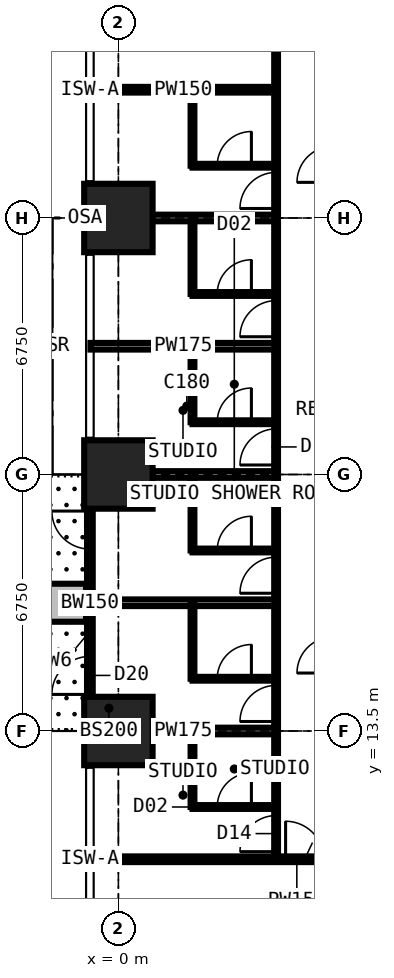
"""IFC4 building model, lengths in metres.
Left out: names, types, materials, properties, quantities, classifications, styles, units other than length and angle.
Written with IfcOpenShell. Run it as: python <this file> out.ifc"""

import sys

from ifc_helpers import new_model, si_unit, direction, frame, frame_2d, origin, origin_2d, place, context, subcontext, project, spatial, rectangle, extrude, element, fill, save


model = new_model("IFC4")
c1 = context("Model", 3, precision=1e-05, world=origin(), true_north=direction((0.0, 1.0)))
c2 = subcontext(c1, "Body", "Model", "MODEL_VIEW")
j1 = project(units=[si_unit("LENGTHUNIT", "METRE"), si_unit("PLANEANGLEUNIT", "RADIAN")], contexts=[c1])
p1 = place(None, origin())
s1 = spatial("IfcSite", under=j1, at=p1, CompositionType="ELEMENT")
p2 = place(p1, origin())
s2 = spatial("IfcBuilding", under=s1, at=p2, CompositionType="ELEMENT")
p3 = place(p2, frame((0.0, 0.0, 61.2)))
s3 = spatial("IfcBuildingStorey", under=s2, at=p3, CompositionType="ELEMENT", Elevation=61.2)
for number, where, z_axis, x_axis in (
    (1, (0.0, 13.5, 0.0), (0.0, 0.0, 1.0), (1.0, 0.0, 0.0)),
    (2, (0.0, 20.25, 0.0), (0.0, 0.0, 1.0), (1.0, 0.0, 0.0)),
    (3, (0.0, 27.0, 0.0), (0.0, 0.0, 1.0), (1.0, 0.0, 0.0)),
):
    element("IfcColumn", number, at=place(p3, frame(where, z_axis=z_axis, x_axis=x_axis)), inside=s3, PredefinedType="COLUMN", context=c2, shape_type="SweptSolid", body=[
        extrude(rectangle(XDim=1.8, YDim=1.8, at=origin_2d()), origin(), (0.0, 0.0, 1.0), 3.6),
    ])
p4 = place(p3, frame((-0.75, 13.5, 0.0), z_axis=(0.0, 0.0, 1.0), x_axis=(0.0, 1.0, 0.0)))
e4 = element("IfcWall", 4, at=p4, inside=s3, PredefinedType="SOLIDWALL", context=c2, shape_type="SweptSolid", body=[
    extrude(rectangle(XDim=6.75, YDim=0.15, at=frame_2d((3.375, 0.0))), origin(), (0.0, 0.0, 1.0), 3.375),
])
p5 = place(p4, frame((0.962, 0.0, 0.0)))
e5 = element("IfcOpeningElement", 5, at=p5, cuts=e4, PredefinedType="OPENING", context=c2, shape_type="SweptSolid", body=[
    extrude(rectangle(XDim=1.0, YDim=2.2, at=frame_2d((0.5, 1.1))), frame((0.0, 0.085, 0.0), z_axis=(0.0, -1.0, 0.0), x_axis=(1.0, 0.0, 0.0)), (0.0, 0.0, 1.0), 0.17),
])
p6 = place(p4, frame((2.025, 0.0, 0.9)))
e6 = element("IfcOpeningElement", 6, at=p6, cuts=e4, PredefinedType="OPENING", context=c2, shape_type="SweptSolid", body=[
    extrude(rectangle(XDim=1.2, YDim=1.8, at=frame_2d((0.6, 0.9))), frame((0.0, 0.085, 0.0), z_axis=(0.0, -1.0, 0.0), x_axis=(1.0, 0.0, 0.0)), (0.0, 0.0, 1.0), 0.17),
])
p7 = place(p4, frame((4.788, 0.0, 0.0)))
e7 = element("IfcOpeningElement", 7, at=p7, cuts=e4, PredefinedType="OPENING", context=c2, shape_type="SweptSolid", body=[
    extrude(rectangle(XDim=1.0, YDim=2.2, at=frame_2d((0.5, 1.1))), frame((0.0, 0.085, 0.0), z_axis=(0.0, -1.0, 0.0), x_axis=(1.0, 0.0, 0.0)), (0.0, 0.0, 1.0), 0.17),
])
p8 = place(p4, frame((3.525, 0.0, 0.9)))
e8 = element("IfcOpeningElement", 8, at=p8, cuts=e4, PredefinedType="OPENING", context=c2, shape_type="SweptSolid", body=[
    extrude(rectangle(XDim=1.2, YDim=1.8, at=frame_2d((0.6, 0.9))), frame((0.0, 0.085, 0.0), z_axis=(0.0, -1.0, 0.0), x_axis=(1.0, 0.0, 0.0)), (0.0, 0.0, 1.0), 0.17),
])
p9 = place(p3, frame((-0.85, 16.875, 0.0), z_axis=(0.0, 0.0, 1.0), x_axis=(-1.0, 0.0, 0.0)))
e9 = element("IfcWall", 9, at=p9, inside=s3, PredefinedType="USERDEFINED", context=c2, shape_type="SweptSolid", body=[
    extrude(rectangle(XDim=2.2, YDim=1.0, at=frame_2d((1.1, 0.0))), origin(), (0.0, 0.0, 1.0), 0.9),
])
p10 = place(p3, frame((-0.734, 10.125, 0.0), z_axis=(0.0, 0.0, 1.0), x_axis=(1.0, 0.0, 0.0)))
e10 = element("IfcWall", 10, at=p10, inside=s3, PredefinedType="PARTITIONING", context=c2, shape_type="SweptSolid", body=[
    extrude(rectangle(XDim=10.859, YDim=0.15, at=frame_2d((5.429, 0.0))), origin(), (0.0, 0.0, 1.0), 3.375),
])
p11 = place(p10, frame((5.134, 0.0, 0.0)))
e11 = element("IfcOpeningElement", 11, at=p11, cuts=e10, PredefinedType="OPENING", context=c2, shape_type="SweptSolid", body=[
    extrude(rectangle(XDim=1.0, YDim=2.2, at=frame_2d((0.5, 1.1))), frame((0.0, 0.085, 0.0), z_axis=(0.0, -1.0, 0.0), x_axis=(1.0, 0.0, 0.0)), (0.0, 0.0, 1.0), 0.17),
])
p12 = place(p3, frame((-0.734, 13.5, 0.0), z_axis=(0.0, 0.0, 1.0), x_axis=(1.0, 0.0, 0.0)))
e12 = element("IfcWall", 12, at=p12, inside=s3, PredefinedType="PARTITIONING", context=c2, shape_type="SweptSolid", body=[
    extrude(rectangle(XDim=4.884, YDim=0.175, at=frame_2d((2.442, 0.0))), origin(), (0.0, 0.0, 1.0), 2.877),
])
p13 = place(p3, frame((-0.734, 16.875, 0.0), z_axis=(0.0, 0.0, 1.0), x_axis=(1.0, 0.0, 0.0)))
e13 = element("IfcWall", 13, at=p13, inside=s3, PredefinedType="PARTITIONING", context=c2, shape_type="SweptSolid", body=[
    extrude(rectangle(XDim=4.884, YDim=0.175, at=frame_2d((2.442, 0.0))), origin(), (0.0, 0.0, 1.0), 3.375),
])
p14 = place(p3, frame((-0.734, 20.25, 0.0), z_axis=(0.0, 0.0, 1.0), x_axis=(1.0, 0.0, 0.0)))
e14 = element("IfcWall", 14, at=p14, inside=s3, PredefinedType="PARTITIONING", context=c2, shape_type="SweptSolid", body=[
    extrude(rectangle(XDim=4.884, YDim=0.175, at=frame_2d((2.442, 0.0))), origin(), (0.0, 0.0, 1.0), 2.61),
])
p15 = place(p3, frame((-0.734, 23.625, 0.0), z_axis=(0.0, 0.0, 1.0), x_axis=(1.0, 0.0, 0.0)))
e15 = element("IfcWall", 15, at=p15, inside=s3, PredefinedType="PARTITIONING", context=c2, shape_type="SweptSolid", body=[
    extrude(rectangle(XDim=4.884, YDim=0.175, at=frame_2d((2.442, 0.0))), origin(), (0.0, 0.0, 1.0), 3.375),
])
p16 = place(p3, frame((-0.734, 27.0, 0.0), z_axis=(0.0, 0.0, 1.0), x_axis=(1.0, 0.0, 0.0)))
e16 = element("IfcWall", 16, at=p16, inside=s3, PredefinedType="PARTITIONING", context=c2, shape_type="SweptSolid", body=[
    extrude(rectangle(XDim=4.884, YDim=0.175, at=frame_2d((2.442, 0.0))), origin(), (0.0, 0.0, 1.0), 2.61),
])
p17 = place(p3, frame((-0.734, 30.375, 0.0), z_axis=(0.0, 0.0, 1.0), x_axis=(1.0, 0.0, 0.0)))
e17 = element("IfcWall", 17, at=p17, inside=s3, PredefinedType="PARTITIONING", context=c2, shape_type="SweptSolid", body=[
    extrude(rectangle(XDim=4.884, YDim=0.15, at=frame_2d((2.442, 0.0))), origin(), (0.0, 0.0, 1.0), 3.375),
])
p18 = place(p3, frame((1.95, 11.5, 0.0), z_axis=(0.0, 0.0, 1.0), x_axis=(0.0, 1.0, 0.0)))
e18 = element("IfcWall", 18, at=p18, inside=s3, PredefinedType="PARTITIONING", context=c2, shape_type="SweptSolid", body=[
    extrude(rectangle(XDim=2.0, YDim=0.1, at=frame_2d((1.0, 0.0))), origin(), (0.0, 0.0, 1.0), 3.375),
])
p19 = place(p3, frame((1.95, 11.5, 0.0), z_axis=(0.0, 0.0, 1.0), x_axis=(1.0, 0.0, 0.0)))
e19 = element("IfcWall", 19, at=p19, inside=s3, PredefinedType="PARTITIONING", context=c2, shape_type="SweptSolid", body=[
    extrude(rectangle(XDim=2.2, YDim=0.1, at=frame_2d((1.1, 0.0))), origin(), (0.0, 0.0, 1.0), 3.375),
])
p20 = place(p19, frame((0.65, 0.0, 0.0)))
e20 = element("IfcOpeningElement", 20, at=p20, cuts=e19, PredefinedType="OPENING", context=c2, shape_type="SweptSolid", body=[
    extrude(rectangle(XDim=0.9, YDim=2.2, at=frame_2d((0.45, 1.1))), frame((0.0, 0.06, 0.0), z_axis=(0.0, -1.0, 0.0), x_axis=(1.0, 0.0, 0.0)), (0.0, 0.0, 1.0), 0.12),
])
p21 = place(p3, frame((1.95, 14.875, 0.0), z_axis=(0.0, 0.0, 1.0), x_axis=(0.0, 1.0, 0.0)))
e21 = element("IfcWall", 21, at=p21, inside=s3, PredefinedType="PARTITIONING", context=c2, shape_type="SweptSolid", body=[
    extrude(rectangle(XDim=2.0, YDim=0.1, at=frame_2d((1.0, 0.0))), origin(), (0.0, 0.0, 1.0), 3.375),
])
p22 = place(p3, frame((1.95, 14.875, 0.0), z_axis=(0.0, 0.0, 1.0), x_axis=(1.0, 0.0, 0.0)))
e22 = element("IfcWall", 22, at=p22, inside=s3, PredefinedType="PARTITIONING", context=c2, shape_type="SweptSolid", body=[
    extrude(rectangle(XDim=2.2, YDim=0.1, at=frame_2d((1.1, 0.0))), origin(), (0.0, 0.0, 1.0), 3.375),
])
p23 = place(p22, frame((0.65, 0.0, 0.0)))
e23 = element("IfcOpeningElement", 23, at=p23, cuts=e22, PredefinedType="OPENING", context=c2, shape_type="SweptSolid", body=[
    extrude(rectangle(XDim=0.9, YDim=2.2, at=frame_2d((0.45, 1.1))), frame((0.0, 0.06, 0.0), z_axis=(0.0, -1.0, 0.0), x_axis=(1.0, 0.0, 0.0)), (0.0, 0.0, 1.0), 0.12),
])
p24 = place(p3, frame((1.95, 18.25, 0.0), z_axis=(0.0, 0.0, 1.0), x_axis=(0.0, 1.0, 0.0)))
e24 = element("IfcWall", 24, at=p24, inside=s3, PredefinedType="PARTITIONING", context=c2, shape_type="SweptSolid", body=[
    extrude(rectangle(XDim=2.0, YDim=0.1, at=frame_2d((1.0, 0.0))), origin(), (0.0, 0.0, 1.0), 3.375),
])
p25 = place(p3, frame((1.95, 18.25, 0.0), z_axis=(0.0, 0.0, 1.0), x_axis=(1.0, 0.0, 0.0)))
e25 = element("IfcWall", 25, at=p25, inside=s3, PredefinedType="PARTITIONING", context=c2, shape_type="SweptSolid", body=[
    extrude(rectangle(XDim=2.2, YDim=0.1, at=frame_2d((1.1, 0.0))), origin(), (0.0, 0.0, 1.0), 3.375),
])
p26 = place(p25, frame((0.65, 0.0, 0.0)))
e26 = element("IfcOpeningElement", 26, at=p26, cuts=e25, PredefinedType="OPENING", context=c2, shape_type="SweptSolid", body=[
    extrude(rectangle(XDim=0.9, YDim=2.2, at=frame_2d((0.45, 1.1))), frame((0.0, 0.06, 0.0), z_axis=(0.0, -1.0, 0.0), x_axis=(1.0, 0.0, 0.0)), (0.0, 0.0, 1.0), 0.12),
])
p27 = place(p3, frame((1.95, 21.625, 0.0), z_axis=(0.0, 0.0, 1.0), x_axis=(0.0, 1.0, 0.0)))
e27 = element("IfcWall", 27, at=p27, inside=s3, PredefinedType="PARTITIONING", context=c2, shape_type="SweptSolid", body=[
    extrude(rectangle(XDim=2.0, YDim=0.1, at=frame_2d((1.0, 0.0))), origin(), (0.0, 0.0, 1.0), 3.375),
])
p28 = place(p3, frame((1.95, 21.625, 0.0), z_axis=(0.0, 0.0, 1.0), x_axis=(1.0, 0.0, 0.0)))
e28 = element("IfcWall", 28, at=p28, inside=s3, PredefinedType="PARTITIONING", context=c2, shape_type="SweptSolid", body=[
    extrude(rectangle(XDim=2.2, YDim=0.1, at=frame_2d((1.1, 0.0))), origin(), (0.0, 0.0, 1.0), 3.375),
])
p29 = place(p28, frame((0.65, 0.0, 0.0)))
e29 = element("IfcOpeningElement", 29, at=p29, cuts=e28, PredefinedType="OPENING", context=c2, shape_type="SweptSolid", body=[
    extrude(rectangle(XDim=0.9, YDim=2.2, at=frame_2d((0.45, 1.1))), frame((0.0, 0.06, 0.0), z_axis=(0.0, -1.0, 0.0), x_axis=(1.0, 0.0, 0.0)), (0.0, 0.0, 1.0), 0.12),
])
p30 = place(p3, frame((1.95, 25.0, 0.0), z_axis=(0.0, 0.0, 1.0), x_axis=(0.0, 1.0, 0.0)))
e30 = element("IfcWall", 30, at=p30, inside=s3, PredefinedType="PARTITIONING", context=c2, shape_type="SweptSolid", body=[
    extrude(rectangle(XDim=2.0, YDim=0.1, at=frame_2d((1.0, 0.0))), origin(), (0.0, 0.0, 1.0), 3.375),
])
p31 = place(p3, frame((1.95, 25.0, 0.0), z_axis=(0.0, 0.0, 1.0), x_axis=(1.0, 0.0, 0.0)))
e31 = element("IfcWall", 31, at=p31, inside=s3, PredefinedType="PARTITIONING", context=c2, shape_type="SweptSolid", body=[
    extrude(rectangle(XDim=2.2, YDim=0.1, at=frame_2d((1.1, 0.0))), origin(), (0.0, 0.0, 1.0), 3.375),
])
p32 = place(p31, frame((0.65, 0.0, 0.0)))
e32 = element("IfcOpeningElement", 32, at=p32, cuts=e31, PredefinedType="OPENING", context=c2, shape_type="SweptSolid", body=[
    extrude(rectangle(XDim=0.9, YDim=2.2, at=frame_2d((0.45, 1.1))), frame((0.0, 0.06, 0.0), z_axis=(0.0, -1.0, 0.0), x_axis=(1.0, 0.0, 0.0)), (0.0, 0.0, 1.0), 0.12),
])
p33 = place(p3, frame((1.95, 28.375, 0.0), z_axis=(0.0, 0.0, 1.0), x_axis=(0.0, 1.0, 0.0)))
e33 = element("IfcWall", 33, at=p33, inside=s3, PredefinedType="PARTITIONING", context=c2, shape_type="SweptSolid", body=[
    extrude(rectangle(XDim=2.0, YDim=0.1, at=frame_2d((1.0, 0.0))), origin(), (0.0, 0.0, 1.0), 3.375),
])
p34 = place(p3, frame((1.95, 28.375, 0.0), z_axis=(0.0, 0.0, 1.0), x_axis=(1.0, 0.0, 0.0)))
e34 = element("IfcWall", 34, at=p34, inside=s3, PredefinedType="PARTITIONING", context=c2, shape_type="SweptSolid", body=[
    extrude(rectangle(XDim=2.2, YDim=0.1, at=frame_2d((1.1, 0.0))), origin(), (0.0, 0.0, 1.0), 3.375),
])
p35 = place(p34, frame((0.65, 0.0, 0.0)))
e35 = element("IfcOpeningElement", 35, at=p35, cuts=e34, PredefinedType="OPENING", context=c2, shape_type="SweptSolid", body=[
    extrude(rectangle(XDim=0.9, YDim=2.2, at=frame_2d((0.45, 1.1))), frame((0.0, 0.06, 0.0), z_axis=(0.0, -1.0, 0.0), x_axis=(1.0, 0.0, 0.0)), (0.0, 0.0, 1.0), 0.12),
])
p36 = place(p3, frame((4.15, 10.125, 0.0), z_axis=(0.0, 0.0, 1.0), x_axis=(0.0, 1.0, 0.0)))
e36 = element("IfcWall", 36, at=p36, inside=s3, PredefinedType="PARTITIONING", context=c2, shape_type="SweptSolid", body=[
    extrude(rectangle(XDim=23.625, YDim=0.1, at=frame_2d((11.812, 0.0))), origin(), (0.0, 0.0, 1.0), 3.375),
])
p37 = place(p36, frame((0.2, 0.0, 0.0)))
e37 = element("IfcOpeningElement", 37, at=p37, cuts=e36, PredefinedType="OPENING", context=c2, shape_type="SweptSolid", body=[
    extrude(rectangle(XDim=0.95, YDim=2.2, at=frame_2d((0.475, 1.1))), frame((0.0, 0.06, 0.0), z_axis=(0.0, -1.0, 0.0), x_axis=(1.0, 0.0, 0.0)), (0.0, 0.0, 1.0), 0.12),
])
p38 = place(p36, frame((3.625, 0.0, 0.0)))
e38 = element("IfcOpeningElement", 38, at=p38, cuts=e36, PredefinedType="OPENING", context=c2, shape_type="SweptSolid", body=[
    extrude(rectangle(XDim=0.95, YDim=2.2, at=frame_2d((0.475, 1.1))), frame((0.0, 0.06, 0.0), z_axis=(0.0, -1.0, 0.0), x_axis=(1.0, 0.0, 0.0)), (0.0, 0.0, 1.0), 0.12),
])
p39 = place(p36, frame((7.0, 0.0, 0.0)))
e39 = element("IfcOpeningElement", 39, at=p39, cuts=e36, PredefinedType="OPENING", context=c2, shape_type="SweptSolid", body=[
    extrude(rectangle(XDim=0.95, YDim=2.2, at=frame_2d((0.475, 1.1))), frame((0.0, 0.06, 0.0), z_axis=(0.0, -1.0, 0.0), x_axis=(1.0, 0.0, 0.0)), (0.0, 0.0, 1.0), 0.12),
])
p40 = place(p36, frame((10.375, 0.0, 0.0)))
e40 = element("IfcOpeningElement", 40, at=p40, cuts=e36, PredefinedType="OPENING", context=c2, shape_type="SweptSolid", body=[
    extrude(rectangle(XDim=0.95, YDim=2.2, at=frame_2d((0.475, 1.1))), frame((0.0, 0.06, 0.0), z_axis=(0.0, -1.0, 0.0), x_axis=(1.0, 0.0, 0.0)), (0.0, 0.0, 1.0), 0.12),
])
p41 = place(p36, frame((13.75, 0.0, 0.0)))
e41 = element("IfcOpeningElement", 41, at=p41, cuts=e36, PredefinedType="OPENING", context=c2, shape_type="SweptSolid", body=[
    extrude(rectangle(XDim=0.95, YDim=2.2, at=frame_2d((0.475, 1.1))), frame((0.0, 0.06, 0.0), z_axis=(0.0, -1.0, 0.0), x_axis=(1.0, 0.0, 0.0)), (0.0, 0.0, 1.0), 0.12),
])
p42 = place(p36, frame((17.125, 0.0, 0.0)))
e42 = element("IfcOpeningElement", 42, at=p42, cuts=e36, PredefinedType="OPENING", context=c2, shape_type="SweptSolid", body=[
    extrude(rectangle(XDim=0.95, YDim=2.2, at=frame_2d((0.475, 1.1))), frame((0.0, 0.06, 0.0), z_axis=(0.0, -1.0, 0.0), x_axis=(1.0, 0.0, 0.0)), (0.0, 0.0, 1.0), 0.12),
])
p43 = place(p5, origin())
e43 = element("IfcDoor", 43, at=p43, inside=s3, OperationType="SINGLE_SWING_LEFT", PredefinedType="DOOR", context=c2, shape_type="SweptSolid", body=[
    extrude(rectangle(XDim=1.0, YDim=2.2, at=frame_2d((0.5, 1.1))), frame((0.0, 0.025, 0.0), z_axis=(0.0, -1.0, 0.0), x_axis=(1.0, 0.0, 0.0)), (0.0, 0.0, 1.0), 0.05),
])
fill(e5, e43)
p44 = place(p6, origin())
e44 = element("IfcWindow", 44, at=p44, inside=s3, PartitioningType="SINGLE_PANEL", PredefinedType="WINDOW", context=c2, shape_type="SweptSolid", body=[
    extrude(rectangle(XDim=1.2, YDim=1.8, at=frame_2d((0.6, 0.9))), frame((0.0, 0.03, 0.0), z_axis=(0.0, -1.0, 0.0), x_axis=(1.0, 0.0, 0.0)), (0.0, 0.0, 1.0), 0.06),
])
fill(e6, e44)
p45 = place(p7, origin())
e45 = element("IfcDoor", 45, at=p45, inside=s3, OperationType="SINGLE_SWING_RIGHT", PredefinedType="DOOR", context=c2, shape_type="SweptSolid", body=[
    extrude(rectangle(XDim=1.0, YDim=2.2, at=frame_2d((0.5, 1.1))), frame((0.0, 0.025, 0.0), z_axis=(0.0, -1.0, 0.0), x_axis=(1.0, 0.0, 0.0)), (0.0, 0.0, 1.0), 0.05),
])
fill(e7, e45)
p46 = place(p8, origin())
e46 = element("IfcWindow", 46, at=p46, inside=s3, PartitioningType="SINGLE_PANEL", PredefinedType="WINDOW", context=c2, shape_type="SweptSolid", body=[
    extrude(rectangle(XDim=1.2, YDim=1.8, at=frame_2d((0.6, 0.9))), frame((0.0, 0.03, 0.0), z_axis=(0.0, -1.0, 0.0), x_axis=(1.0, 0.0, 0.0)), (0.0, 0.0, 1.0), 0.06),
])
fill(e8, e46)
p47 = place(p11, origin())
e47 = element("IfcDoor", 47, at=p47, inside=s3, OperationType="SINGLE_SWING_LEFT", PredefinedType="DOOR", context=c2, shape_type="SweptSolid", body=[
    extrude(rectangle(XDim=1.0, YDim=2.2, at=frame_2d((0.5, 1.1))), frame((0.0, 0.025, 0.0), z_axis=(0.0, -1.0, 0.0), x_axis=(1.0, 0.0, 0.0)), (0.0, 0.0, 1.0), 0.05),
])
fill(e11, e47)
p48 = place(p37, origin())
e48 = element("IfcDoor", 48, at=p48, inside=s3, OperationType="SINGLE_SWING_LEFT", PredefinedType="DOOR", context=c2, shape_type="SweptSolid", body=[
    extrude(rectangle(XDim=0.95, YDim=2.2, at=frame_2d((0.475, 1.1))), frame((0.0, 0.025, 0.0), z_axis=(0.0, -1.0, 0.0), x_axis=(1.0, 0.0, 0.0)), (0.0, 0.0, 1.0), 0.05),
])
fill(e37, e48)
p49 = place(p20, origin())
e49 = element("IfcDoor", 49, at=p49, inside=s3, OperationType="SINGLE_SWING_RIGHT", PredefinedType="DOOR", context=c2, shape_type="SweptSolid", body=[
    extrude(rectangle(XDim=0.9, YDim=2.2, at=frame_2d((0.45, 1.1))), frame((0.0, 0.025, 0.0), z_axis=(0.0, -1.0, 0.0), x_axis=(1.0, 0.0, 0.0)), (0.0, 0.0, 1.0), 0.05),
])
fill(e20, e49)
p50 = place(p38, origin())
e50 = element("IfcDoor", 50, at=p50, inside=s3, OperationType="SINGLE_SWING_LEFT", PredefinedType="DOOR", context=c2, shape_type="SweptSolid", body=[
    extrude(rectangle(XDim=0.95, YDim=2.2, at=frame_2d((0.475, 1.1))), frame((0.0, 0.025, 0.0), z_axis=(0.0, -1.0, 0.0), x_axis=(1.0, 0.0, 0.0)), (0.0, 0.0, 1.0), 0.05),
])
fill(e38, e50)
p51 = place(p23, origin())
e51 = element("IfcDoor", 51, at=p51, inside=s3, OperationType="SINGLE_SWING_RIGHT", PredefinedType="DOOR", context=c2, shape_type="SweptSolid", body=[
    extrude(rectangle(XDim=0.9, YDim=2.2, at=frame_2d((0.45, 1.1))), frame((0.0, 0.025, 0.0), z_axis=(0.0, -1.0, 0.0), x_axis=(1.0, 0.0, 0.0)), (0.0, 0.0, 1.0), 0.05),
])
fill(e23, e51)
p52 = place(p39, origin())
e52 = element("IfcDoor", 52, at=p52, inside=s3, OperationType="SINGLE_SWING_LEFT", PredefinedType="DOOR", context=c2, shape_type="SweptSolid", body=[
    extrude(rectangle(XDim=0.95, YDim=2.2, at=frame_2d((0.475, 1.1))), frame((0.0, 0.025, 0.0), z_axis=(0.0, -1.0, 0.0), x_axis=(1.0, 0.0, 0.0)), (0.0, 0.0, 1.0), 0.05),
])
fill(e39, e52)
p53 = place(p26, origin())
e53 = element("IfcDoor", 53, at=p53, inside=s3, OperationType="SINGLE_SWING_RIGHT", PredefinedType="DOOR", context=c2, shape_type="SweptSolid", body=[
    extrude(rectangle(XDim=0.9, YDim=2.2, at=frame_2d((0.45, 1.1))), frame((0.0, 0.025, 0.0), z_axis=(0.0, -1.0, 0.0), x_axis=(1.0, 0.0, 0.0)), (0.0, 0.0, 1.0), 0.05),
])
fill(e26, e53)
p54 = place(p40, origin())
e54 = element("IfcDoor", 54, at=p54, inside=s3, OperationType="SINGLE_SWING_LEFT", PredefinedType="DOOR", context=c2, shape_type="SweptSolid", body=[
    extrude(rectangle(XDim=0.95, YDim=2.2, at=frame_2d((0.475, 1.1))), frame((0.0, 0.025, 0.0), z_axis=(0.0, -1.0, 0.0), x_axis=(1.0, 0.0, 0.0)), (0.0, 0.0, 1.0), 0.05),
])
fill(e40, e54)
p55 = place(p29, origin())
e55 = element("IfcDoor", 55, at=p55, inside=s3, OperationType="SINGLE_SWING_RIGHT", PredefinedType="DOOR", context=c2, shape_type="SweptSolid", body=[
    extrude(rectangle(XDim=0.9, YDim=2.2, at=frame_2d((0.45, 1.1))), frame((0.0, 0.025, 0.0), z_axis=(0.0, -1.0, 0.0), x_axis=(1.0, 0.0, 0.0)), (0.0, 0.0, 1.0), 0.05),
])
fill(e29, e55)
p56 = place(p41, origin())
e56 = element("IfcDoor", 56, at=p56, inside=s3, OperationType="SINGLE_SWING_LEFT", PredefinedType="DOOR", context=c2, shape_type="SweptSolid", body=[
    extrude(rectangle(XDim=0.95, YDim=2.2, at=frame_2d((0.475, 1.1))), frame((0.0, 0.025, 0.0), z_axis=(0.0, -1.0, 0.0), x_axis=(1.0, 0.0, 0.0)), (0.0, 0.0, 1.0), 0.05),
])
fill(e41, e56)
p57 = place(p32, origin())
e57 = element("IfcDoor", 57, at=p57, inside=s3, OperationType="SINGLE_SWING_RIGHT", PredefinedType="DOOR", context=c2, shape_type="SweptSolid", body=[
    extrude(rectangle(XDim=0.9, YDim=2.2, at=frame_2d((0.45, 1.1))), frame((0.0, 0.025, 0.0), z_axis=(0.0, -1.0, 0.0), x_axis=(1.0, 0.0, 0.0)), (0.0, 0.0, 1.0), 0.05),
])
fill(e32, e57)
p58 = place(p42, origin())
e58 = element("IfcDoor", 58, at=p58, inside=s3, OperationType="SINGLE_SWING_LEFT", PredefinedType="DOOR", context=c2, shape_type="SweptSolid", body=[
    extrude(rectangle(XDim=0.95, YDim=2.2, at=frame_2d((0.475, 1.1))), frame((0.0, 0.025, 0.0), z_axis=(0.0, -1.0, 0.0), x_axis=(1.0, 0.0, 0.0)), (0.0, 0.0, 1.0), 0.05),
])
fill(e42, e58)
p59 = place(p35, origin())
e59 = element("IfcDoor", 59, at=p59, inside=s3, OperationType="SINGLE_SWING_RIGHT", PredefinedType="DOOR", context=c2, shape_type="SweptSolid", body=[
    extrude(rectangle(XDim=0.9, YDim=2.2, at=frame_2d((0.45, 1.1))), frame((0.0, 0.025, 0.0), z_axis=(0.0, -1.0, 0.0), x_axis=(1.0, 0.0, 0.0)), (0.0, 0.0, 1.0), 0.05),
])
fill(e35, e59)
save(model, sys.argv[1])
